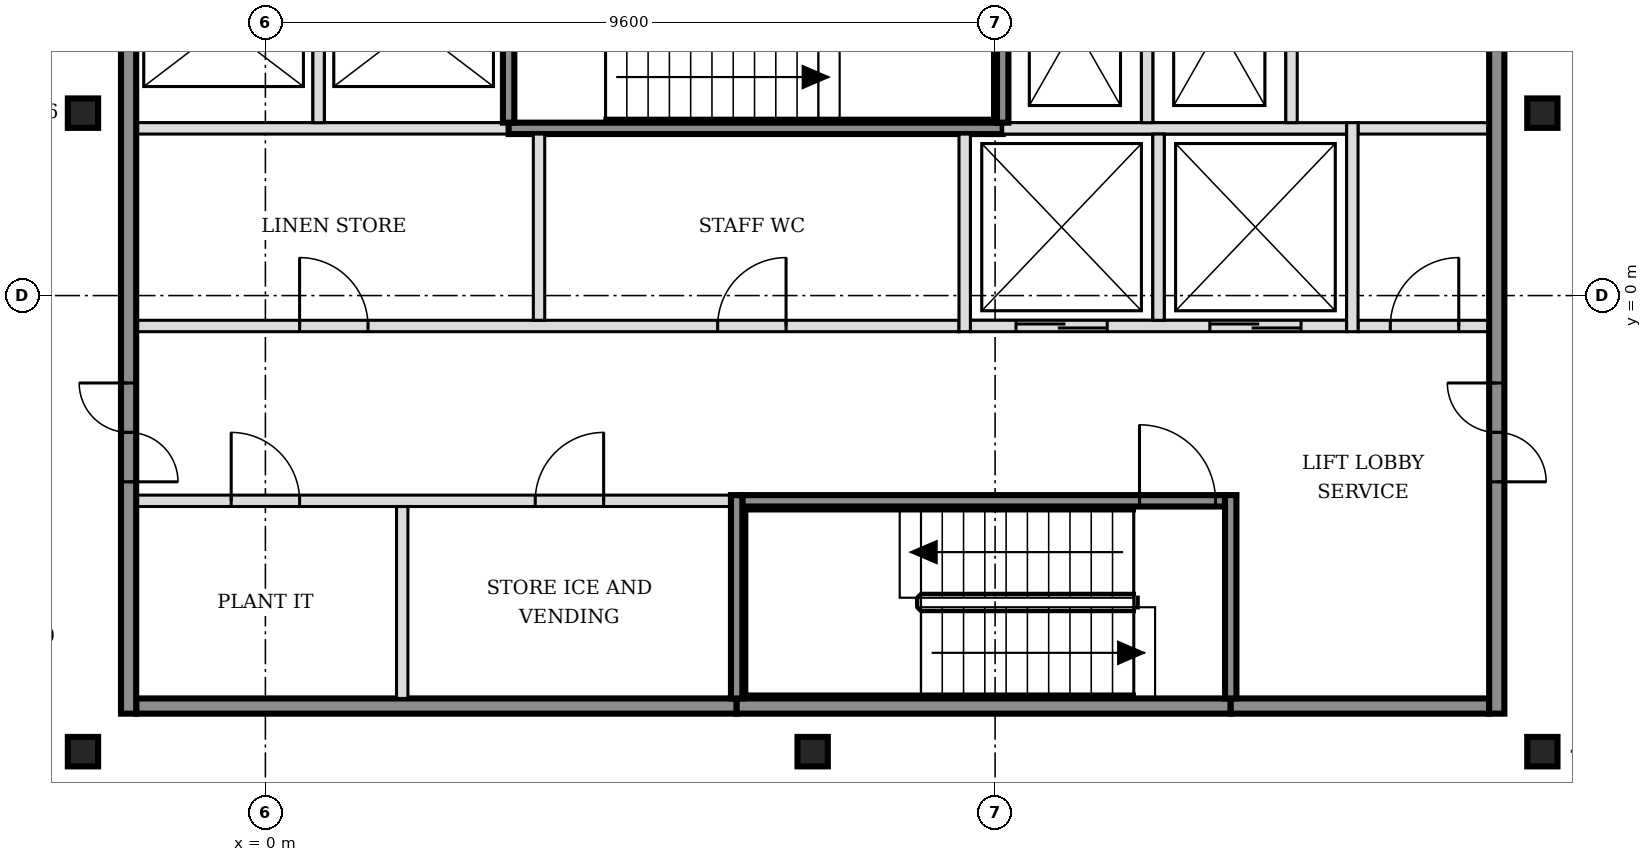
"""IFC4 building model, lengths in metres.
Left out: names, types, materials, properties, quantities, classifications, styles, units other than length and angle.
Written with IfcOpenShell. Run it as: python <this file> out.ifc"""

import sys

from ifc_helpers import new_model, si_unit, direction, frame, frame_2d, origin, origin_2d, place, context, subcontext, project, spatial, rectangle, i_section, extrude, element, fill, save


model = new_model("IFC4")
c1 = context("Model", 3, precision=1e-05, world=origin(), true_north=direction((0.0, 1.0)))
c2 = subcontext(c1, "Body", "Model", "MODEL_VIEW")
j1 = project(units=[si_unit("LENGTHUNIT", "METRE"), si_unit("PLANEANGLEUNIT", "RADIAN")], contexts=[c1])
p1 = place(None, origin())
s1 = spatial("IfcSite", under=j1, at=p1, CompositionType="ELEMENT")
p2 = place(p1, origin())
s2 = spatial("IfcBuilding", under=s1, at=p2, CompositionType="ELEMENT")
p3 = place(p2, frame((0.0, 0.0, 285.0)))
s3 = spatial("IfcBuildingStorey", under=s2, at=p3, CompositionType="ELEMENT", Elevation=285.0)
for number, where, z_axis, x_axis in (
    (1, (-2.4, -6.0, -0.15), (0.0, 0.0, 1.0), (1.0, 0.0, 0.0)),
    (2, (7.2, -6.0, -0.15), (0.0, 0.0, 1.0), (1.0, 0.0, 0.0)),
    (3, (16.8, -6.0, -0.15), (0.0, 0.0, 1.0), (1.0, 0.0, 0.0)),
    (4, (-2.4, 2.4, -0.15), (0.0, 0.0, 1.0), (1.0, 0.0, 0.0)),
    (5, (16.8, 2.4, -0.15), (0.0, 0.0, 1.0), (1.0, 0.0, 0.0)),
):
    element("IfcColumn", number, at=place(p3, frame(where, z_axis=z_axis, x_axis=x_axis)), inside=s3, PredefinedType="COLUMN", context=c2, shape_type="SweptSolid", body=[
        extrude(i_section(OverallWidth=0.398, OverallDepth=0.387, WebThickness=0.021, FlangeThickness=0.033, FilletRadius=0.015, at=origin_2d()), origin(), (0.0, 0.0, 1.0), 3.6),
    ])
p4 = place(p3, frame((-1.7, -5.4, 0.0), z_axis=(0.0, 0.0, 1.0), x_axis=(1.0, 0.0, 0.0)))
e6 = element("IfcWall", 6, at=p4, inside=s3, PredefinedType="SOLIDWALL", context=c2, shape_type="SweptSolid", body=[
    extrude(rectangle(XDim=7.9, YDim=0.2, at=frame_2d((3.95, 0.0))), origin(), (0.0, 0.0, 1.0), 3.45),
])
p5 = place(p3, frame((6.2, -5.4, 0.0), z_axis=(0.0, 0.0, 1.0), x_axis=(1.0, 0.0, 0.0)))
e7 = element("IfcWall", 7, at=p5, inside=s3, PredefinedType="SOLIDWALL", context=c2, shape_type="SweptSolid", body=[
    extrude(rectangle(XDim=6.5, YDim=0.2, at=frame_2d((3.25, 0.0))), origin(), (0.0, 0.0, 1.0), 3.45),
])
p6 = place(p3, frame((12.7, -5.4, 0.0), z_axis=(0.0, 0.0, 1.0), x_axis=(1.0, 0.0, 0.0)))
e8 = element("IfcWall", 8, at=p6, inside=s3, PredefinedType="SOLIDWALL", context=c2, shape_type="SweptSolid", body=[
    extrude(rectangle(XDim=3.4, YDim=0.2, at=frame_2d((1.7, 0.0))), origin(), (0.0, 0.0, 1.0), 3.45),
])
p7 = place(p3, frame((-1.7, -2.7, 0.0), z_axis=(0.0, 0.0, 1.0), x_axis=(1.0, 0.0, 0.0)))
e9 = element("IfcWall", 9, at=p7, inside=s3, PredefinedType="PARTITIONING", context=c2, shape_type="SweptSolid", body=[
    extrude(rectangle(XDim=7.825, YDim=0.15, at=frame_2d((3.913, 0.0))), origin(), (0.0, 0.0, 1.0), 3.45),
])
p8 = place(p7, frame((1.25, 0.0, 0.0)))
e10 = element("IfcOpeningElement", 10, at=p8, cuts=e9, PredefinedType="OPENING", context=c2, shape_type="SweptSolid", body=[
    extrude(rectangle(XDim=0.9, YDim=2.1, at=frame_2d((0.45, 1.05))), frame((0.0, 0.085, 0.0), z_axis=(0.0, -1.0, 0.0), x_axis=(1.0, 0.0, 0.0)), (0.0, 0.0, 1.0), 0.17),
])
p9 = place(p7, frame((5.25, 0.0, 0.0)))
e11 = element("IfcOpeningElement", 11, at=p9, cuts=e9, PredefinedType="OPENING", context=c2, shape_type="SweptSolid", body=[
    extrude(rectangle(XDim=0.9, YDim=2.1, at=frame_2d((0.45, 1.05))), frame((0.0, 0.085, 0.0), z_axis=(0.0, -1.0, 0.0), x_axis=(1.0, 0.0, 0.0)), (0.0, 0.0, 1.0), 0.17),
])
p10 = place(p3, frame((6.275, -2.7, 0.0), z_axis=(0.0, 0.0, 1.0), x_axis=(1.0, 0.0, 0.0)))
e12 = element("IfcWall", 12, at=p10, inside=s3, PredefinedType="SOLIDWALL", context=c2, shape_type="SweptSolid", body=[
    extrude(rectangle(XDim=6.35, YDim=0.15, at=frame_2d((3.175, 0.0))), origin(), (0.0, 0.0, 1.0), 3.45),
])
p11 = place(p10, frame((5.225, 0.0, 0.0)))
e13 = element("IfcOpeningElement", 13, at=p11, cuts=e12, PredefinedType="OPENING", context=c2, shape_type="SweptSolid", body=[
    extrude(rectangle(XDim=1.0, YDim=2.1, at=frame_2d((0.5, 1.05))), frame((0.0, 0.085, 0.0), z_axis=(0.0, -1.0, 0.0), x_axis=(1.0, 0.0, 0.0)), (0.0, 0.0, 1.0), 0.17),
])
p12 = place(p3, frame((-1.7, -0.4, 0.0), z_axis=(0.0, 0.0, 1.0), x_axis=(1.0, 0.0, 0.0)))
e14 = element("IfcWall", 14, at=p12, inside=s3, PredefinedType="PARTITIONING", context=c2, shape_type="SweptSolid", body=[
    extrude(rectangle(XDim=10.825, YDim=0.15, at=frame_2d((5.413, 0.0))), origin(), (0.0, 0.0, 1.0), 3.45),
])
p13 = place(p12, frame((2.15, 0.0, 0.0)))
e15 = element("IfcOpeningElement", 15, at=p13, cuts=e14, PredefinedType="OPENING", context=c2, shape_type="SweptSolid", body=[
    extrude(rectangle(XDim=0.9, YDim=2.1, at=frame_2d((0.45, 1.05))), frame((0.0, 0.085, 0.0), z_axis=(0.0, -1.0, 0.0), x_axis=(1.0, 0.0, 0.0)), (0.0, 0.0, 1.0), 0.17),
])
p14 = place(p12, frame((7.65, 0.0, 0.0)))
e16 = element("IfcOpeningElement", 16, at=p14, cuts=e14, PredefinedType="OPENING", context=c2, shape_type="SweptSolid", body=[
    extrude(rectangle(XDim=0.9, YDim=2.1, at=frame_2d((0.45, 1.05))), frame((0.0, 0.085, 0.0), z_axis=(0.0, -1.0, 0.0), x_axis=(1.0, 0.0, 0.0)), (0.0, 0.0, 1.0), 0.17),
])
p15 = place(p3, frame((9.275, -0.4, 0.0), z_axis=(0.0, 0.0, 1.0), x_axis=(1.0, 0.0, 0.0)))
e17 = element("IfcWall", 17, at=p15, inside=s3, PredefinedType="SOLIDWALL", context=c2, shape_type="SweptSolid", body=[
    extrude(rectangle(XDim=4.95, YDim=0.15, at=frame_2d((2.475, 0.0))), origin(), (0.0, 0.0, 1.0), 3.45),
])
p16 = place(p15, frame((0.6, 0.0, 0.0)))
e18 = element("IfcOpeningElement", 18, at=p16, cuts=e17, PredefinedType="OPENING", context=c2, shape_type="SweptSolid", body=[
    extrude(rectangle(XDim=1.2, YDim=2.1, at=frame_2d((0.6, 1.05))), frame((0.0, 0.085, 0.0), z_axis=(0.0, -1.0, 0.0), x_axis=(1.0, 0.0, 0.0)), (0.0, 0.0, 1.0), 0.17),
])
p17 = place(p15, frame((3.15, 0.0, 0.0)))
e19 = element("IfcOpeningElement", 19, at=p17, cuts=e17, PredefinedType="OPENING", context=c2, shape_type="SweptSolid", body=[
    extrude(rectangle(XDim=1.2, YDim=2.1, at=frame_2d((0.6, 1.05))), frame((0.0, 0.085, 0.0), z_axis=(0.0, -1.0, 0.0), x_axis=(1.0, 0.0, 0.0)), (0.0, 0.0, 1.0), 0.17),
])
p18 = place(p3, frame((14.375, -0.4, 0.0), z_axis=(0.0, 0.0, 1.0), x_axis=(1.0, 0.0, 0.0)))
e20 = element("IfcWall", 20, at=p18, inside=s3, PredefinedType="PARTITIONING", context=c2, shape_type="SweptSolid", body=[
    extrude(rectangle(XDim=1.725, YDim=0.15, at=frame_2d((0.863, 0.0))), origin(), (0.0, 0.0, 1.0), 3.45),
])
p19 = place(p18, frame((0.425, 0.0, 0.0)))
e21 = element("IfcOpeningElement", 21, at=p19, cuts=e20, PredefinedType="OPENING", context=c2, shape_type="SweptSolid", body=[
    extrude(rectangle(XDim=0.9, YDim=2.1, at=frame_2d((0.45, 1.05))), frame((0.0, 0.085, 0.0), z_axis=(0.0, -1.0, 0.0), x_axis=(1.0, 0.0, 0.0)), (0.0, 0.0, 1.0), 0.17),
])
p20 = place(p3, frame((-1.7, 2.2, 0.0), z_axis=(0.0, 0.0, 1.0), x_axis=(1.0, 0.0, 0.0)))
e22 = element("IfcWall", 22, at=p20, inside=s3, PredefinedType="SOLIDWALL", context=c2, shape_type="SweptSolid", body=[
    extrude(rectangle(XDim=4.9, YDim=0.15, at=frame_2d((2.45, 0.0))), origin(), (0.0, 0.0, 1.0), 3.45),
])
p21 = place(p3, frame((3.2, 2.2, 0.0), z_axis=(0.0, 0.0, 1.0), x_axis=(1.0, 0.0, 0.0)))
e23 = element("IfcWall", 23, at=p21, inside=s3, PredefinedType="SOLIDWALL", context=c2, shape_type="SweptSolid", body=[
    extrude(rectangle(XDim=6.5, YDim=0.15, at=frame_2d((3.25, 0.0))), origin(), (0.0, 0.0, 1.0), 3.45),
])
p22 = place(p3, frame((9.7, 2.2, 0.0), z_axis=(0.0, 0.0, 1.0), x_axis=(1.0, 0.0, 0.0)))
e24 = element("IfcWall", 24, at=p22, inside=s3, PredefinedType="SOLIDWALL", context=c2, shape_type="SweptSolid", body=[
    extrude(rectangle(XDim=4.525, YDim=0.15, at=frame_2d((2.263, 0.0))), origin(), (0.0, 0.0, 1.0), 3.45),
])
p23 = place(p3, frame((14.375, 2.2, 0.0), z_axis=(0.0, 0.0, 1.0), x_axis=(1.0, 0.0, 0.0)))
e25 = element("IfcWall", 25, at=p23, inside=s3, PredefinedType="PARTITIONING", context=c2, shape_type="SweptSolid", body=[
    extrude(rectangle(XDim=1.725, YDim=0.15, at=frame_2d((0.863, 0.0))), origin(), (0.0, 0.0, 1.0), 3.45),
])
p24 = place(p3, frame((-1.8, -5.5, 0.0), z_axis=(0.0, 0.0, 1.0), x_axis=(0.0, 1.0, 0.0)))
e26 = element("IfcWall", 26, at=p24, inside=s3, PredefinedType="SOLIDWALL", context=c2, shape_type="SweptSolid", body=[
    extrude(rectangle(XDim=15.8, YDim=0.2, at=frame_2d((7.9, 0.0))), origin(), (0.0, 0.0, 1.0), 3.45),
])
p25 = place(p24, frame((3.05, 0.0, 0.0)))
e27 = element("IfcOpeningElement", 27, at=p25, cuts=e26, PredefinedType="OPENING", context=c2, shape_type="SweptSolid", body=[
    extrude(rectangle(XDim=1.3, YDim=2.1, at=frame_2d((0.65, 1.05))), frame((0.0, 0.11, 0.0), z_axis=(0.0, -1.0, 0.0), x_axis=(1.0, 0.0, 0.0)), (0.0, 0.0, 1.0), 0.22),
])
p26 = place(p24, frame((11.45, 0.0, 0.0)))
e28 = element("IfcOpeningElement", 28, at=p26, cuts=e26, PredefinedType="OPENING", context=c2, shape_type="SweptSolid", body=[
    extrude(rectangle(XDim=1.3, YDim=2.1, at=frame_2d((0.65, 1.05))), frame((0.0, 0.11, 0.0), z_axis=(0.0, -1.0, 0.0), x_axis=(1.0, 0.0, 0.0)), (0.0, 0.0, 1.0), 0.22),
])
p27 = place(p3, frame((0.7, 2.275, 0.0), z_axis=(0.0, 0.0, 1.0), x_axis=(0.0, 1.0, 0.0)))
e29 = element("IfcWall", 29, at=p27, inside=s3, PredefinedType="SOLIDWALL", context=c2, shape_type="SweptSolid", body=[
    extrude(rectangle(XDim=2.55, YDim=0.15, at=frame_2d((1.275, 0.0))), origin(), (0.0, 0.0, 1.0), 3.45),
])
p28 = place(p3, frame((1.8, -5.3, 0.0), z_axis=(0.0, 0.0, 1.0), x_axis=(0.0, 1.0, 0.0)))
e30 = element("IfcWall", 30, at=p28, inside=s3, PredefinedType="PARTITIONING", context=c2, shape_type="SweptSolid", body=[
    extrude(rectangle(XDim=2.525, YDim=0.15, at=frame_2d((1.263, 0.0))), origin(), (0.0, 0.0, 1.0), 3.45),
])
p29 = place(p3, frame((3.2, 2.275, 0.0), z_axis=(0.0, 0.0, 1.0), x_axis=(0.0, 1.0, 0.0)))
e31 = element("IfcWall", 31, at=p29, inside=s3, PredefinedType="SOLIDWALL", context=c2, shape_type="SweptSolid", body=[
    extrude(rectangle(XDim=2.55, YDim=0.15, at=frame_2d((1.275, 0.0))), origin(), (0.0, 0.0, 1.0), 3.45),
])
p30 = place(p3, frame((3.6, -0.325, 0.0), z_axis=(0.0, 0.0, 1.0), x_axis=(0.0, 1.0, 0.0)))
e32 = element("IfcWall", 32, at=p30, inside=s3, PredefinedType="PARTITIONING", context=c2, shape_type="SweptSolid", body=[
    extrude(rectangle(XDim=2.45, YDim=0.15, at=frame_2d((1.225, 0.0))), origin(), (0.0, 0.0, 1.0), 3.45),
])
p31 = place(p3, frame((6.2, -5.3, 0.0), z_axis=(0.0, 0.0, 1.0), x_axis=(0.0, 1.0, 0.0)))
e33 = element("IfcWall", 33, at=p31, inside=s3, PredefinedType="SOLIDWALL", context=c2, shape_type="SweptSolid", body=[
    extrude(rectangle(XDim=2.675, YDim=0.15, at=frame_2d((1.337, 0.0))), origin(), (0.0, 0.0, 1.0), 3.45),
])
p32 = place(p3, frame((9.2, -0.475, 0.0), z_axis=(0.0, 0.0, 1.0), x_axis=(0.0, 1.0, 0.0)))
e34 = element("IfcWall", 34, at=p32, inside=s3, PredefinedType="SOLIDWALL", context=c2, shape_type="SweptSolid", body=[
    extrude(rectangle(XDim=2.6, YDim=0.15, at=frame_2d((1.3, 0.0))), origin(), (0.0, 0.0, 1.0), 3.45),
])
for number, where, z_axis, x_axis in (
    (35, (9.7, 2.275, 0.0), (0.0, 0.0, 1.0), (0.0, 1.0, 0.0)),
    (36, (11.6, 2.275, 0.0), (0.0, 0.0, 1.0), (0.0, 1.0, 0.0)),
):
    element("IfcWall", number, at=place(p3, frame(where, z_axis=z_axis, x_axis=x_axis)), inside=s3, PredefinedType="SOLIDWALL", context=c2, shape_type="SweptSolid", body=[
        extrude(rectangle(XDim=2.55, YDim=0.15, at=frame_2d((1.275, 0.0))), origin(), (0.0, 0.0, 1.0), 3.45),
    ])
p33 = place(p3, frame((11.75, -0.325, 0.0), z_axis=(0.0, 0.0, 1.0), x_axis=(0.0, 1.0, 0.0)))
e37 = element("IfcWall", 37, at=p33, inside=s3, PredefinedType="SOLIDWALL", context=c2, shape_type="SweptSolid", body=[
    extrude(rectangle(XDim=2.45, YDim=0.15, at=frame_2d((1.225, 0.0))), origin(), (0.0, 0.0, 1.0), 3.45),
])
p34 = place(p3, frame((12.7, -5.3, 0.0), z_axis=(0.0, 0.0, 1.0), x_axis=(0.0, 1.0, 0.0)))
e38 = element("IfcWall", 38, at=p34, inside=s3, PredefinedType="SOLIDWALL", context=c2, shape_type="SweptSolid", body=[
    extrude(rectangle(XDim=2.675, YDim=0.15, at=frame_2d((1.337, 0.0))), origin(), (0.0, 0.0, 1.0), 3.45),
])
p35 = place(p3, frame((13.5, 2.275, 0.0), z_axis=(0.0, 0.0, 1.0), x_axis=(0.0, 1.0, 0.0)))
e39 = element("IfcWall", 39, at=p35, inside=s3, PredefinedType="SOLIDWALL", context=c2, shape_type="SweptSolid", body=[
    extrude(rectangle(XDim=2.55, YDim=0.15, at=frame_2d((1.275, 0.0))), origin(), (0.0, 0.0, 1.0), 3.45),
])
p36 = place(p3, frame((14.3, -0.475, 0.0), z_axis=(0.0, 0.0, 1.0), x_axis=(0.0, 1.0, 0.0)))
e40 = element("IfcWall", 40, at=p36, inside=s3, PredefinedType="SOLIDWALL", context=c2, shape_type="SweptSolid", body=[
    extrude(rectangle(XDim=2.75, YDim=0.15, at=frame_2d((1.375, 0.0))), origin(), (0.0, 0.0, 1.0), 3.45),
])
p37 = place(p3, frame((16.2, -5.5, 0.0), z_axis=(0.0, 0.0, 1.0), x_axis=(0.0, 1.0, 0.0)))
e41 = element("IfcWall", 41, at=p37, inside=s3, PredefinedType="SOLIDWALL", context=c2, shape_type="SweptSolid", body=[
    extrude(rectangle(XDim=15.8, YDim=0.2, at=frame_2d((7.9, 0.0))), origin(), (0.0, 0.0, 1.0), 3.45),
])
p38 = place(p37, frame((3.05, 0.0, 0.0)))
e42 = element("IfcOpeningElement", 42, at=p38, cuts=e41, PredefinedType="OPENING", context=c2, shape_type="SweptSolid", body=[
    extrude(rectangle(XDim=1.3, YDim=2.1, at=frame_2d((0.65, 1.05))), frame((0.0, 0.11, 0.0), z_axis=(0.0, -1.0, 0.0), x_axis=(1.0, 0.0, 0.0)), (0.0, 0.0, 1.0), 0.22),
])
p39 = place(p37, frame((11.45, 0.0, 0.0)))
e43 = element("IfcOpeningElement", 43, at=p39, cuts=e41, PredefinedType="OPENING", context=c2, shape_type="SweptSolid", body=[
    extrude(rectangle(XDim=1.3, YDim=2.1, at=frame_2d((0.65, 1.05))), frame((0.0, 0.11, 0.0), z_axis=(0.0, -1.0, 0.0), x_axis=(1.0, 0.0, 0.0)), (0.0, 0.0, 1.0), 0.22),
])
p40 = place(p3, frame((15.497, -15.497, 0.0), z_axis=(0.0, 0.0, 1.0), x_axis=(0.707106781187, 0.707106781187, 0.0)))
e44 = element("IfcWall", 44, at=p40, inside=s3, PredefinedType="PARTITIONING", context=c2, shape_type="SweptSolid", body=[
    extrude(rectangle(XDim=21.79, YDim=0.15, at=frame_2d((10.895, 0.0))), origin(), (0.0, 0.0, 1.0), 2.73),
])
p41 = place(p40, frame((4.927, 0.0, 0.0)))
e45 = element("IfcOpeningElement", 45, at=p41, cuts=e44, PredefinedType="OPENING", context=c2, shape_type="SweptSolid", body=[
    extrude(rectangle(XDim=0.9, YDim=2.1, at=frame_2d((0.45, 1.05))), frame((0.0, 0.085, 0.0), z_axis=(0.0, -1.0, 0.0), x_axis=(1.0, 0.0, 0.0)), (0.0, 0.0, 1.0), 0.17),
])
p42 = place(p40, frame((10.926, 0.0, 0.0)))
e46 = element("IfcOpeningElement", 46, at=p42, cuts=e44, PredefinedType="OPENING", context=c2, shape_type="SweptSolid", body=[
    extrude(rectangle(XDim=0.9, YDim=2.1, at=frame_2d((0.45, 1.05))), frame((0.0, 0.085, 0.0), z_axis=(0.0, -1.0, 0.0), x_axis=(1.0, 0.0, 0.0)), (0.0, 0.0, 1.0), 0.17),
])
p43 = place(p40, frame((19.345, 0.0, 0.0)))
e47 = element("IfcOpeningElement", 47, at=p43, cuts=e44, PredefinedType="OPENING", context=c2, shape_type="SweptSolid", body=[
    extrude(rectangle(XDim=0.9, YDim=2.1, at=frame_2d((0.45, 1.05))), frame((0.0, 0.085, 0.0), z_axis=(0.0, -1.0, 0.0), x_axis=(1.0, 0.0, 0.0)), (0.0, 0.0, 1.0), 0.17),
])
p44 = place(p16, origin())
e48 = element("IfcDoor", 48, at=p44, inside=s3, OperationType="DOUBLE_DOOR_SLIDING", PredefinedType="DOOR", context=c2, shape_type="SweptSolid", body=[
    extrude(rectangle(XDim=1.2, YDim=2.1, at=frame_2d((0.6, 1.05))), frame((0.0, 0.025, 0.0), z_axis=(0.0, -1.0, 0.0), x_axis=(1.0, 0.0, 0.0)), (0.0, 0.0, 1.0), 0.05),
])
fill(e18, e48)
p45 = place(p17, origin())
e49 = element("IfcDoor", 49, at=p45, inside=s3, OperationType="DOUBLE_DOOR_SLIDING", PredefinedType="DOOR", context=c2, shape_type="SweptSolid", body=[
    extrude(rectangle(XDim=1.2, YDim=2.1, at=frame_2d((0.6, 1.05))), frame((0.0, 0.025, 0.0), z_axis=(0.0, -1.0, 0.0), x_axis=(1.0, 0.0, 0.0)), (0.0, 0.0, 1.0), 0.05),
])
fill(e19, e49)
p46 = place(p11, origin())
e50 = element("IfcDoor", 50, at=p46, inside=s3, OperationType="SINGLE_SWING_LEFT", PredefinedType="DOOR", context=c2, shape_type="SweptSolid", body=[
    extrude(rectangle(XDim=1.0, YDim=2.1, at=frame_2d((0.5, 1.05))), frame((0.0, 0.025, 0.0), z_axis=(0.0, -1.0, 0.0), x_axis=(1.0, 0.0, 0.0)), (0.0, 0.0, 1.0), 0.05),
])
fill(e13, e50)
p47 = place(p25, origin())
e51 = element("IfcDoor", 51, at=p47, inside=s3, OperationType="DOUBLE_DOOR_SINGLE_SWING", PredefinedType="DOOR", context=c2, shape_type="SweptSolid", body=[
    extrude(rectangle(XDim=1.3, YDim=2.1, at=frame_2d((0.65, 1.05))), frame((0.0, 0.025, 0.0), z_axis=(0.0, -1.0, 0.0), x_axis=(1.0, 0.0, 0.0)), (0.0, 0.0, 1.0), 0.05),
])
fill(e27, e51)
p48 = place(p38, origin())
e52 = element("IfcDoor", 52, at=p48, inside=s3, OperationType="DOUBLE_DOOR_SINGLE_SWING", PredefinedType="DOOR", context=c2, shape_type="SweptSolid", body=[
    extrude(rectangle(XDim=1.3, YDim=2.1, at=frame_2d((0.65, 1.05))), frame((0.0, 0.025, 0.0), z_axis=(0.0, -1.0, 0.0), x_axis=(1.0, 0.0, 0.0)), (0.0, 0.0, 1.0), 0.05),
])
fill(e42, e52)
p49 = place(p19, origin())
e53 = element("IfcDoor", 53, at=p49, inside=s3, OperationType="SINGLE_SWING_RIGHT", PredefinedType="DOOR", context=c2, shape_type="SweptSolid", body=[
    extrude(rectangle(XDim=0.9, YDim=2.1, at=frame_2d((0.45, 1.05))), frame((0.0, 0.025, 0.0), z_axis=(0.0, -1.0, 0.0), x_axis=(1.0, 0.0, 0.0)), (0.0, 0.0, 1.0), 0.05),
])
fill(e21, e53)
p50 = place(p8, origin())
e54 = element("IfcDoor", 54, at=p50, inside=s3, OperationType="SINGLE_SWING_LEFT", PredefinedType="DOOR", context=c2, shape_type="SweptSolid", body=[
    extrude(rectangle(XDim=0.9, YDim=2.1, at=frame_2d((0.45, 1.05))), frame((0.0, 0.025, 0.0), z_axis=(0.0, -1.0, 0.0), x_axis=(1.0, 0.0, 0.0)), (0.0, 0.0, 1.0), 0.05),
])
fill(e10, e54)
p51 = place(p9, origin())
e55 = element("IfcDoor", 55, at=p51, inside=s3, OperationType="SINGLE_SWING_RIGHT", PredefinedType="DOOR", context=c2, shape_type="SweptSolid", body=[
    extrude(rectangle(XDim=0.9, YDim=2.1, at=frame_2d((0.45, 1.05))), frame((0.0, 0.025, 0.0), z_axis=(0.0, -1.0, 0.0), x_axis=(1.0, 0.0, 0.0)), (0.0, 0.0, 1.0), 0.05),
])
fill(e11, e55)
p52 = place(p13, origin())
e56 = element("IfcDoor", 56, at=p52, inside=s3, OperationType="SINGLE_SWING_LEFT", PredefinedType="DOOR", context=c2, shape_type="SweptSolid", body=[
    extrude(rectangle(XDim=0.9, YDim=2.1, at=frame_2d((0.45, 1.05))), frame((0.0, 0.025, 0.0), z_axis=(0.0, -1.0, 0.0), x_axis=(1.0, 0.0, 0.0)), (0.0, 0.0, 1.0), 0.05),
])
fill(e15, e56)
p53 = place(p14, origin())
e57 = element("IfcDoor", 57, at=p53, inside=s3, OperationType="SINGLE_SWING_RIGHT", PredefinedType="DOOR", context=c2, shape_type="SweptSolid", body=[
    extrude(rectangle(XDim=0.9, YDim=2.1, at=frame_2d((0.45, 1.05))), frame((0.0, 0.025, 0.0), z_axis=(0.0, -1.0, 0.0), x_axis=(1.0, 0.0, 0.0)), (0.0, 0.0, 1.0), 0.05),
])
fill(e16, e57)
save(model, sys.argv[1])
